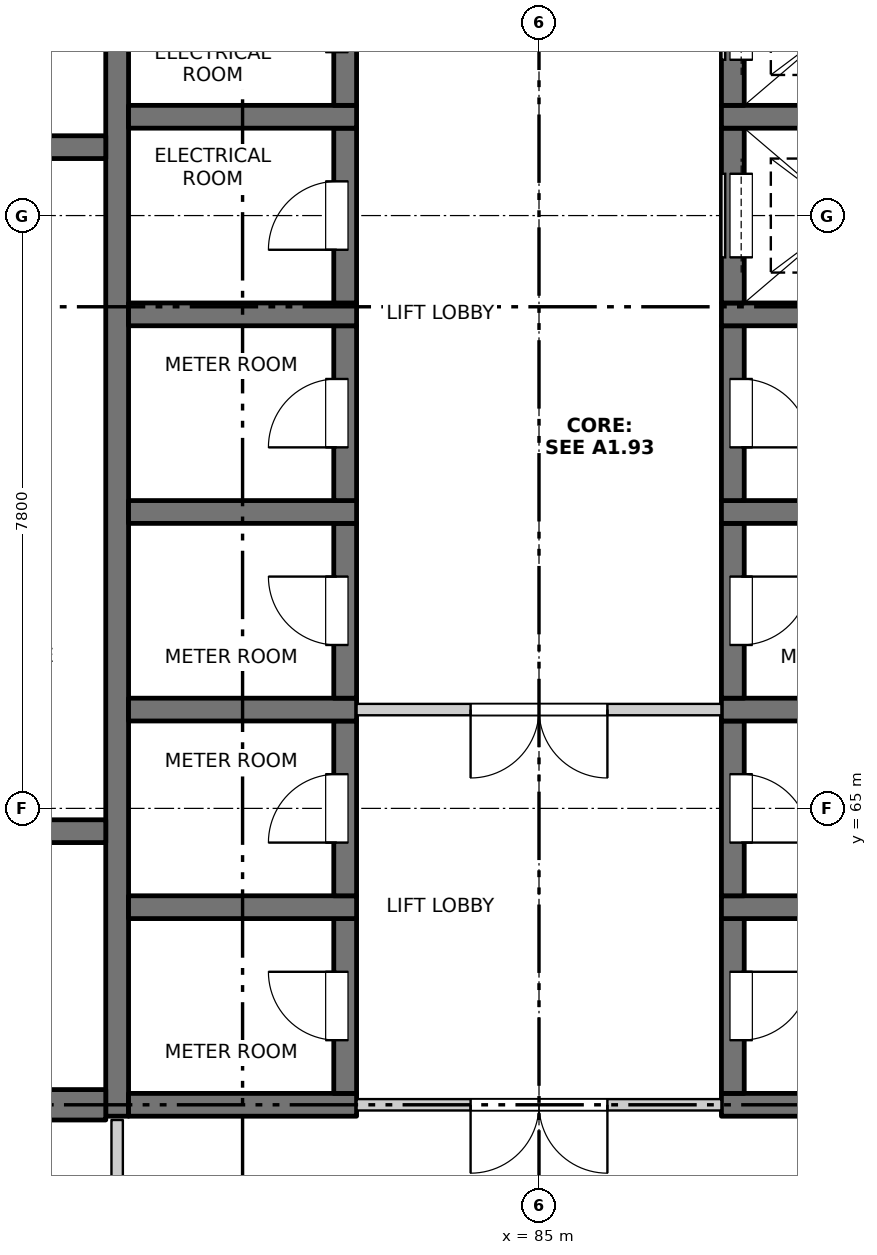
"""IFC4 building model, lengths in metres.
Left out: names, types, materials, properties, quantities, classifications, styles, units other than length and angle.
Written with IfcOpenShell. Run it as: python <this file> out.ifc"""

import sys

from ifc_helpers import new_model, si_unit, direction, frame, frame_2d, origin, place, context, subcontext, project, spatial, rectangle, extrude, element, fill, save


model = new_model("IFC4")
c1 = context("Model", 3, precision=1e-05, world=origin(), true_north=direction((0.0, 1.0)))
c2 = subcontext(c1, "Body", "Model", "MODEL_VIEW")
j1 = project(units=[si_unit("LENGTHUNIT", "METRE"), si_unit("PLANEANGLEUNIT", "RADIAN")], contexts=[c1])
p1 = place(None, origin())
s1 = spatial("IfcSite", under=j1, at=p1, CompositionType="ELEMENT")
p2 = place(p1, origin())
s2 = spatial("IfcBuilding", under=s1, at=p2, CompositionType="ELEMENT")
p3 = place(p2, frame((0.0, 0.0, 155.4)))
s3 = spatial("IfcBuildingStorey", under=s2, at=p3, CompositionType="ELEMENT", Elevation=155.4)
p4 = place(p3, frame((79.45, 60.95, -0.25), z_axis=(0.0, 0.0, 1.0), x_axis=(0.0, 1.0, 0.0)))
e1 = element("IfcWall", 1, at=p4, inside=s3, PredefinedType="SOLIDWALL", context=c2, shape_type="SweptSolid", body=[
    extrude(rectangle(XDim=16.35, YDim=0.3, at=frame_2d((8.175, 0.0))), origin(), (0.0, 0.0, 1.0), 3.4),
])
p5 = place(p3, frame((79.6, 61.1, -0.25), z_axis=(0.0, 0.0, 1.0), x_axis=(1.0, 0.0, 0.0)))
e2 = element("IfcWall", 2, at=p5, inside=s3, PredefinedType="SOLIDWALL", context=c2, shape_type="SweptSolid", body=[
    extrude(rectangle(XDim=3.0, YDim=0.3, at=frame_2d((1.5, 0.0))), origin(), (0.0, 0.0, 1.0), 3.4),
])
p6 = place(p3, frame((82.45, 61.25, -0.25), z_axis=(0.0, 0.0, 1.0), x_axis=(0.0, 1.0, 0.0)))
e3 = element("IfcWall", 3, at=p6, inside=s3, PredefinedType="SOLIDWALL", context=c2, shape_type="SweptSolid", body=[
    extrude(rectangle(XDim=2.3, YDim=0.3, at=frame_2d((1.15, 0.0))), origin(), (0.0, 0.0, 1.0), 3.4),
])
p7 = place(p6, frame((0.7, 0.0, 0.25)))
e4 = element("IfcOpeningElement", 4, at=p7, cuts=e3, PredefinedType="OPENING", context=c2, shape_type="SweptSolid", body=[
    extrude(rectangle(XDim=0.9, YDim=2.1, at=frame_2d((0.45, 1.05))), frame((0.0, 0.16, 0.0), z_axis=(0.0, -1.0, 0.0), x_axis=(1.0, 0.0, 0.0)), (0.0, 0.0, 1.0), 0.32),
])
p8 = place(p3, frame((79.6, 63.7, -0.25), z_axis=(0.0, 0.0, 1.0), x_axis=(1.0, 0.0, 0.0)))
e5 = element("IfcWall", 5, at=p8, inside=s3, PredefinedType="SOLIDWALL", context=c2, shape_type="SweptSolid", body=[
    extrude(rectangle(XDim=3.0, YDim=0.3, at=frame_2d((1.5, 0.0))), origin(), (0.0, 0.0, 1.0), 3.4),
])
p9 = place(p3, frame((82.45, 63.85, -0.25), z_axis=(0.0, 0.0, 1.0), x_axis=(0.0, 1.0, 0.0)))
e6 = element("IfcWall", 6, at=p9, inside=s3, PredefinedType="SOLIDWALL", context=c2, shape_type="SweptSolid", body=[
    extrude(rectangle(XDim=2.3, YDim=0.3, at=frame_2d((1.15, 0.0))), origin(), (0.0, 0.0, 1.0), 3.4),
])
p10 = place(p9, frame((0.7, 0.0, 0.25)))
e7 = element("IfcOpeningElement", 7, at=p10, cuts=e6, PredefinedType="OPENING", context=c2, shape_type="SweptSolid", body=[
    extrude(rectangle(XDim=0.9, YDim=2.1, at=frame_2d((0.45, 1.05))), frame((0.0, 0.16, 0.0), z_axis=(0.0, -1.0, 0.0), x_axis=(1.0, 0.0, 0.0)), (0.0, 0.0, 1.0), 0.32),
])
p11 = place(p3, frame((79.6, 66.3, -0.25), z_axis=(0.0, 0.0, 1.0), x_axis=(1.0, 0.0, 0.0)))
e8 = element("IfcWall", 8, at=p11, inside=s3, PredefinedType="SOLIDWALL", context=c2, shape_type="SweptSolid", body=[
    extrude(rectangle(XDim=3.0, YDim=0.3, at=frame_2d((1.5, 0.0))), origin(), (0.0, 0.0, 1.0), 3.4),
])
p12 = place(p3, frame((82.45, 66.45, -0.25), z_axis=(0.0, 0.0, 1.0), x_axis=(0.0, 1.0, 0.0)))
e9 = element("IfcWall", 9, at=p12, inside=s3, PredefinedType="SOLIDWALL", context=c2, shape_type="SweptSolid", body=[
    extrude(rectangle(XDim=2.3, YDim=0.3, at=frame_2d((1.15, 0.0))), origin(), (0.0, 0.0, 1.0), 3.4),
])
p13 = place(p12, frame((0.7, 0.0, 0.25)))
e10 = element("IfcOpeningElement", 10, at=p13, cuts=e9, PredefinedType="OPENING", context=c2, shape_type="SweptSolid", body=[
    extrude(rectangle(XDim=0.9, YDim=2.1, at=frame_2d((0.45, 1.05))), frame((0.0, 0.16, 0.0), z_axis=(0.0, -1.0, 0.0), x_axis=(1.0, 0.0, 0.0)), (0.0, 0.0, 1.0), 0.32),
])
p14 = place(p3, frame((79.6, 68.9, -0.25), z_axis=(0.0, 0.0, 1.0), x_axis=(1.0, 0.0, 0.0)))
e11 = element("IfcWall", 11, at=p14, inside=s3, PredefinedType="SOLIDWALL", context=c2, shape_type="SweptSolid", body=[
    extrude(rectangle(XDim=3.0, YDim=0.3, at=frame_2d((1.5, 0.0))), origin(), (0.0, 0.0, 1.0), 3.4),
])
p15 = place(p3, frame((82.45, 69.05, -0.25), z_axis=(0.0, 0.0, 1.0), x_axis=(0.0, 1.0, 0.0)))
e12 = element("IfcWall", 12, at=p15, inside=s3, PredefinedType="SOLIDWALL", context=c2, shape_type="SweptSolid", body=[
    extrude(rectangle(XDim=2.3, YDim=0.3, at=frame_2d((1.15, 0.0))), origin(), (0.0, 0.0, 1.0), 3.4),
])
p16 = place(p15, frame((0.7, 0.0, 0.25)))
e13 = element("IfcOpeningElement", 13, at=p16, cuts=e12, PredefinedType="OPENING", context=c2, shape_type="SweptSolid", body=[
    extrude(rectangle(XDim=0.9, YDim=2.1, at=frame_2d((0.45, 1.05))), frame((0.0, 0.16, 0.0), z_axis=(0.0, -1.0, 0.0), x_axis=(1.0, 0.0, 0.0)), (0.0, 0.0, 1.0), 0.32),
])
p17 = place(p3, frame((79.6, 71.5, -0.25), z_axis=(0.0, 0.0, 1.0), x_axis=(1.0, 0.0, 0.0)))
e14 = element("IfcWall", 14, at=p17, inside=s3, PredefinedType="SOLIDWALL", context=c2, shape_type="SweptSolid", body=[
    extrude(rectangle(XDim=3.0, YDim=0.3, at=frame_2d((1.5, 0.0))), origin(), (0.0, 0.0, 1.0), 3.4),
])
p18 = place(p3, frame((82.45, 71.65, -0.25), z_axis=(0.0, 0.0, 1.0), x_axis=(0.0, 1.0, 0.0)))
e15 = element("IfcWall", 15, at=p18, inside=s3, PredefinedType="SOLIDWALL", context=c2, shape_type="SweptSolid", body=[
    extrude(rectangle(XDim=2.3, YDim=0.3, at=frame_2d((1.15, 0.0))), origin(), (0.0, 0.0, 1.0), 3.4),
])
p19 = place(p18, frame((0.7, 0.0, 0.25)))
e16 = element("IfcOpeningElement", 16, at=p19, cuts=e15, PredefinedType="OPENING", context=c2, shape_type="SweptSolid", body=[
    extrude(rectangle(XDim=0.9, YDim=2.1, at=frame_2d((0.45, 1.05))), frame((0.0, 0.16, 0.0), z_axis=(0.0, -1.0, 0.0), x_axis=(1.0, 0.0, 0.0)), (0.0, 0.0, 1.0), 0.32),
])
p20 = place(p3, frame((79.6, 74.1, -0.25), z_axis=(0.0, 0.0, 1.0), x_axis=(1.0, 0.0, 0.0)))
e17 = element("IfcWall", 17, at=p20, inside=s3, PredefinedType="SOLIDWALL", context=c2, shape_type="SweptSolid", body=[
    extrude(rectangle(XDim=3.0, YDim=0.3, at=frame_2d((1.5, 0.0))), origin(), (0.0, 0.0, 1.0), 3.4),
])
p21 = place(p3, frame((82.45, 74.25, -0.25), z_axis=(0.0, 0.0, 1.0), x_axis=(0.0, 1.0, 0.0)))
e18 = element("IfcWall", 18, at=p21, inside=s3, PredefinedType="SOLIDWALL", context=c2, shape_type="SweptSolid", body=[
    extrude(rectangle(XDim=2.3, YDim=0.3, at=frame_2d((1.15, 0.0))), origin(), (0.0, 0.0, 1.0), 3.4),
])
p22 = place(p21, frame((0.7, 0.0, 0.25)))
e19 = element("IfcOpeningElement", 19, at=p22, cuts=e18, PredefinedType="OPENING", context=c2, shape_type="SweptSolid", body=[
    extrude(rectangle(XDim=0.9, YDim=2.1, at=frame_2d((0.45, 1.05))), frame((0.0, 0.16, 0.0), z_axis=(0.0, -1.0, 0.0), x_axis=(1.0, 0.0, 0.0)), (0.0, 0.0, 1.0), 0.32),
])
p23 = place(p3, frame((87.4, 61.1, -0.25), z_axis=(0.0, 0.0, 1.0), x_axis=(1.0, 0.0, 0.0)))
e20 = element("IfcWall", 20, at=p23, inside=s3, PredefinedType="SOLIDWALL", context=c2, shape_type="SweptSolid", body=[
    extrude(rectangle(XDim=3.0, YDim=0.3, at=frame_2d((1.5, 0.0))), origin(), (0.0, 0.0, 1.0), 3.4),
])
p24 = place(p3, frame((87.55, 61.25, -0.25), z_axis=(0.0, 0.0, 1.0), x_axis=(0.0, 1.0, 0.0)))
e21 = element("IfcWall", 21, at=p24, inside=s3, PredefinedType="SOLIDWALL", context=c2, shape_type="SweptSolid", body=[
    extrude(rectangle(XDim=2.3, YDim=0.3, at=frame_2d((1.15, 0.0))), origin(), (0.0, 0.0, 1.0), 3.4),
])
p25 = place(p24, frame((0.7, 0.0, 0.25)))
e22 = element("IfcOpeningElement", 22, at=p25, cuts=e21, PredefinedType="OPENING", context=c2, shape_type="SweptSolid", body=[
    extrude(rectangle(XDim=0.9, YDim=2.1, at=frame_2d((0.45, 1.05))), frame((0.0, 0.16, 0.0), z_axis=(0.0, -1.0, 0.0), x_axis=(1.0, 0.0, 0.0)), (0.0, 0.0, 1.0), 0.32),
])
p26 = place(p3, frame((87.4, 63.7, -0.25), z_axis=(0.0, 0.0, 1.0), x_axis=(1.0, 0.0, 0.0)))
e23 = element("IfcWall", 23, at=p26, inside=s3, PredefinedType="SOLIDWALL", context=c2, shape_type="SweptSolid", body=[
    extrude(rectangle(XDim=3.0, YDim=0.3, at=frame_2d((1.5, 0.0))), origin(), (0.0, 0.0, 1.0), 3.4),
])
p27 = place(p3, frame((87.55, 63.85, -0.25), z_axis=(0.0, 0.0, 1.0), x_axis=(0.0, 1.0, 0.0)))
e24 = element("IfcWall", 24, at=p27, inside=s3, PredefinedType="SOLIDWALL", context=c2, shape_type="SweptSolid", body=[
    extrude(rectangle(XDim=2.3, YDim=0.3, at=frame_2d((1.15, 0.0))), origin(), (0.0, 0.0, 1.0), 3.4),
])
p28 = place(p27, frame((0.7, 0.0, 0.25)))
e25 = element("IfcOpeningElement", 25, at=p28, cuts=e24, PredefinedType="OPENING", context=c2, shape_type="SweptSolid", body=[
    extrude(rectangle(XDim=0.9, YDim=2.1, at=frame_2d((0.45, 1.05))), frame((0.0, 0.16, 0.0), z_axis=(0.0, -1.0, 0.0), x_axis=(1.0, 0.0, 0.0)), (0.0, 0.0, 1.0), 0.32),
])
p29 = place(p3, frame((87.4, 66.3, -0.25), z_axis=(0.0, 0.0, 1.0), x_axis=(1.0, 0.0, 0.0)))
e26 = element("IfcWall", 26, at=p29, inside=s3, PredefinedType="SOLIDWALL", context=c2, shape_type="SweptSolid", body=[
    extrude(rectangle(XDim=3.0, YDim=0.3, at=frame_2d((1.5, 0.0))), origin(), (0.0, 0.0, 1.0), 3.4),
])
p30 = place(p3, frame((87.55, 66.45, -0.25), z_axis=(0.0, 0.0, 1.0), x_axis=(0.0, 1.0, 0.0)))
e27 = element("IfcWall", 27, at=p30, inside=s3, PredefinedType="SOLIDWALL", context=c2, shape_type="SweptSolid", body=[
    extrude(rectangle(XDim=2.3, YDim=0.3, at=frame_2d((1.15, 0.0))), origin(), (0.0, 0.0, 1.0), 3.4),
])
p31 = place(p30, frame((0.7, 0.0, 0.25)))
e28 = element("IfcOpeningElement", 28, at=p31, cuts=e27, PredefinedType="OPENING", context=c2, shape_type="SweptSolid", body=[
    extrude(rectangle(XDim=0.9, YDim=2.1, at=frame_2d((0.45, 1.05))), frame((0.0, 0.16, 0.0), z_axis=(0.0, -1.0, 0.0), x_axis=(1.0, 0.0, 0.0)), (0.0, 0.0, 1.0), 0.32),
])
p32 = place(p3, frame((87.4, 68.9, -0.25), z_axis=(0.0, 0.0, 1.0), x_axis=(1.0, 0.0, 0.0)))
e29 = element("IfcWall", 29, at=p32, inside=s3, PredefinedType="SOLIDWALL", context=c2, shape_type="SweptSolid", body=[
    extrude(rectangle(XDim=3.0, YDim=0.3, at=frame_2d((1.5, 0.0))), origin(), (0.0, 0.0, 1.0), 3.4),
])
p33 = place(p3, frame((87.55, 69.05, -0.25), z_axis=(0.0, 0.0, 1.0), x_axis=(0.0, 1.0, 0.0)))
e30 = element("IfcWall", 30, at=p33, inside=s3, PredefinedType="SOLIDWALL", context=c2, shape_type="SweptSolid", body=[
    extrude(rectangle(XDim=2.3, YDim=0.3, at=frame_2d((1.15, 0.0))), origin(), (0.0, 0.0, 1.0), 3.4),
])
p34 = place(p33, frame((0.7, 0.0, 0.25)))
e31 = element("IfcOpeningElement", 31, at=p34, cuts=e30, PredefinedType="OPENING", context=c2, shape_type="SweptSolid", body=[
    extrude(rectangle(XDim=0.9, YDim=2.1, at=frame_2d((0.45, 1.05))), frame((0.0, 0.16, 0.0), z_axis=(0.0, -1.0, 0.0), x_axis=(1.0, 0.0, 0.0)), (0.0, 0.0, 1.0), 0.32),
])
p35 = place(p3, frame((87.4, 71.5, -0.25), z_axis=(0.0, 0.0, 1.0), x_axis=(1.0, 0.0, 0.0)))
e32 = element("IfcWall", 32, at=p35, inside=s3, PredefinedType="SOLIDWALL", context=c2, shape_type="SweptSolid", body=[
    extrude(rectangle(XDim=3.0, YDim=0.3, at=frame_2d((1.5, 0.0))), origin(), (0.0, 0.0, 1.0), 3.4),
])
p36 = place(p3, frame((87.55, 71.65, -0.25), z_axis=(0.0, 0.0, 1.0), x_axis=(0.0, 1.0, 0.0)))
e33 = element("IfcWall", 33, at=p36, inside=s3, PredefinedType="SOLIDWALL", context=c2, shape_type="SweptSolid", body=[
    extrude(rectangle(XDim=2.3, YDim=0.3, at=frame_2d((1.15, 0.0))), origin(), (0.0, 0.0, 1.0), 3.4),
])
p37 = place(p36, frame((0.6, 0.0, 0.25)))
e34 = element("IfcOpeningElement", 34, at=p37, cuts=e33, PredefinedType="OPENING", context=c2, shape_type="SweptSolid", body=[
    extrude(rectangle(XDim=1.1, YDim=2.1, at=frame_2d((0.55, 1.05))), frame((0.0, 0.16, 0.0), z_axis=(0.0, -1.0, 0.0), x_axis=(1.0, 0.0, 0.0)), (0.0, 0.0, 1.0), 0.32),
])
p38 = place(p3, frame((87.4, 74.1, -0.25), z_axis=(0.0, 0.0, 1.0), x_axis=(1.0, 0.0, 0.0)))
e35 = element("IfcWall", 35, at=p38, inside=s3, PredefinedType="SOLIDWALL", context=c2, shape_type="SweptSolid", body=[
    extrude(rectangle(XDim=3.0, YDim=0.3, at=frame_2d((1.5, 0.0))), origin(), (0.0, 0.0, 1.0), 3.4),
])
p39 = place(p3, frame((87.55, 74.25, -0.25), z_axis=(0.0, 0.0, 1.0), x_axis=(0.0, 1.0, 0.0)))
e36 = element("IfcWall", 36, at=p39, inside=s3, PredefinedType="SOLIDWALL", context=c2, shape_type="SweptSolid", body=[
    extrude(rectangle(XDim=2.3, YDim=0.3, at=frame_2d((1.15, 0.0))), origin(), (0.0, 0.0, 1.0), 3.4),
])
p40 = place(p39, frame((0.6, 0.0, 0.25)))
e37 = element("IfcOpeningElement", 37, at=p40, cuts=e36, PredefinedType="OPENING", context=c2, shape_type="SweptSolid", body=[
    extrude(rectangle(XDim=1.1, YDim=2.1, at=frame_2d((0.55, 1.05))), frame((0.0, 0.16, 0.0), z_axis=(0.0, -1.0, 0.0), x_axis=(1.0, 0.0, 0.0)), (0.0, 0.0, 1.0), 0.32),
])
p41 = place(p3, frame((75.525, 61.1, -0.25), z_axis=(0.0, 0.0, 1.0), x_axis=(1.0, 0.0, 0.0)))
e38 = element("IfcWall", 38, at=p41, inside=s3, PredefinedType="SOLIDWALL", context=c2, shape_type="SweptSolid", body=[
    extrude(rectangle(XDim=3.775, YDim=0.4, at=frame_2d((1.888, 0.0))), origin(), (0.0, 0.0, 1.0), 3.4),
])
for number, where, z_axis, x_axis in (
    (39, (75.525, 64.7, -0.25), (0.0, 0.0, 1.0), (1.0, 0.0, 0.0)),
    (40, (75.525, 73.7, -0.25), (0.0, 0.0, 1.0), (1.0, 0.0, 0.0)),
):
    element("IfcWall", number, at=place(p3, frame(where, z_axis=z_axis, x_axis=x_axis)), inside=s3, PredefinedType="SOLIDWALL", context=c2, shape_type="SweptSolid", body=[
        extrude(rectangle(XDim=3.775, YDim=0.3, at=frame_2d((1.888, 0.0))), origin(), (0.0, 0.0, 1.0), 3.4),
    ])
p42 = place(p3, frame((82.6, 61.1, 0.0), z_axis=(0.0, 0.0, 1.0), x_axis=(1.0, 0.0, 0.0)))
e41 = element("IfcWall", 41, at=p42, inside=s3, PredefinedType="PARTITIONING", context=c2, shape_type="SweptSolid", body=[
    extrude(rectangle(XDim=4.8, YDim=0.15, at=frame_2d((2.4, 0.0))), origin(), (0.0, 0.0, 1.0), 3.15),
])
p43 = place(p42, frame((1.5, 0.0, 0.0)))
e42 = element("IfcOpeningElement", 42, at=p43, cuts=e41, PredefinedType="OPENING", context=c2, shape_type="SweptSolid", body=[
    extrude(rectangle(XDim=1.8, YDim=2.1, at=frame_2d((0.9, 1.05))), frame((0.0, 0.085, 0.0), z_axis=(0.0, -1.0, 0.0), x_axis=(1.0, 0.0, 0.0)), (0.0, 0.0, 1.0), 0.17),
])
p44 = place(p3, frame((82.6, 66.3, 0.0), z_axis=(0.0, 0.0, 1.0), x_axis=(1.0, 0.0, 0.0)))
e43 = element("IfcWall", 43, at=p44, inside=s3, PredefinedType="PARTITIONING", context=c2, shape_type="SweptSolid", body=[
    extrude(rectangle(XDim=4.8, YDim=0.15, at=frame_2d((2.4, 0.0))), origin(), (0.0, 0.0, 1.0), 3.15),
])
p45 = place(p44, frame((1.5, 0.0, 0.0)))
e44 = element("IfcOpeningElement", 44, at=p45, cuts=e43, PredefinedType="OPENING", context=c2, shape_type="SweptSolid", body=[
    extrude(rectangle(XDim=1.8, YDim=2.1, at=frame_2d((0.9, 1.05))), frame((0.0, 0.085, 0.0), z_axis=(0.0, -1.0, 0.0), x_axis=(1.0, 0.0, 0.0)), (0.0, 0.0, 1.0), 0.17),
])
p46 = place(p3, frame((79.45, 55.525, 0.0), z_axis=(0.0, 0.0, 1.0), x_axis=(0.0, 1.0, 0.0)))
e45 = element("IfcWall", 45, at=p46, inside=s3, PredefinedType="PARTITIONING", context=c2, shape_type="SweptSolid", body=[
    extrude(rectangle(XDim=5.375, YDim=0.15, at=frame_2d((2.688, 0.0))), origin(), (0.0, 0.0, 1.0), 3.15),
])
p47 = place(p46, frame((2.175, 0.0, 0.0)))
e46 = element("IfcOpeningElement", 46, at=p47, cuts=e45, PredefinedType="OPENING", context=c2, shape_type="SweptSolid", body=[
    extrude(rectangle(XDim=0.9, YDim=2.1, at=frame_2d((0.45, 1.05))), frame((0.0, 0.085, 0.0), z_axis=(0.0, -1.0, 0.0), x_axis=(1.0, 0.0, 0.0)), (0.0, 0.0, 1.0), 0.17),
])
p48 = place(p43, origin())
e47 = element("IfcDoor", 47, at=p48, inside=s3, OperationType="DOUBLE_DOOR_SINGLE_SWING", PredefinedType="DOOR", context=c2, shape_type="SweptSolid", body=[
    extrude(rectangle(XDim=1.8, YDim=2.1, at=frame_2d((0.9, 1.05))), frame((0.0, 0.025, 0.0), z_axis=(0.0, -1.0, 0.0), x_axis=(1.0, 0.0, 0.0)), (0.0, 0.0, 1.0), 0.05),
])
fill(e42, e47)
p49 = place(p7, origin())
e48 = element("IfcDoor", 48, at=p49, inside=s3, OperationType="SINGLE_SWING_RIGHT", PredefinedType="DOOR", context=c2, shape_type="SweptSolid", body=[
    extrude(rectangle(XDim=0.9, YDim=2.1, at=frame_2d((0.45, 1.05))), frame((0.0, 0.135, 0.0), z_axis=(0.0, -1.0, 0.0), x_axis=(1.0, 0.0, 0.0)), (0.0, 0.0, 1.0), 0.05),
])
fill(e4, e48)
p50 = place(p25, origin())
e49 = element("IfcDoor", 49, at=p50, inside=s3, OperationType="SINGLE_SWING_LEFT", PredefinedType="DOOR", context=c2, shape_type="SweptSolid", body=[
    extrude(rectangle(XDim=0.9, YDim=2.1, at=frame_2d((0.45, 1.05))), frame((0.0, -0.085, 0.0), z_axis=(0.0, -1.0, 0.0), x_axis=(1.0, 0.0, 0.0)), (0.0, 0.0, 1.0), 0.05),
])
fill(e22, e49)
p51 = place(p10, origin())
e50 = element("IfcDoor", 50, at=p51, inside=s3, OperationType="SINGLE_SWING_LEFT", PredefinedType="DOOR", context=c2, shape_type="SweptSolid", body=[
    extrude(rectangle(XDim=0.9, YDim=2.1, at=frame_2d((0.45, 1.05))), frame((0.0, 0.135, 0.0), z_axis=(0.0, -1.0, 0.0), x_axis=(1.0, 0.0, 0.0)), (0.0, 0.0, 1.0), 0.05),
])
fill(e7, e50)
p52 = place(p28, origin())
e51 = element("IfcDoor", 51, at=p52, inside=s3, OperationType="SINGLE_SWING_RIGHT", PredefinedType="DOOR", context=c2, shape_type="SweptSolid", body=[
    extrude(rectangle(XDim=0.9, YDim=2.1, at=frame_2d((0.45, 1.05))), frame((0.0, -0.085, 0.0), z_axis=(0.0, -1.0, 0.0), x_axis=(1.0, 0.0, 0.0)), (0.0, 0.0, 1.0), 0.05),
])
fill(e25, e51)
p53 = place(p45, origin())
e52 = element("IfcDoor", 52, at=p53, inside=s3, OperationType="DOUBLE_DOOR_SINGLE_SWING", PredefinedType="DOOR", context=c2, shape_type="SweptSolid", body=[
    extrude(rectangle(XDim=1.8, YDim=2.1, at=frame_2d((0.9, 1.05))), frame((0.0, 0.025, 0.0), z_axis=(0.0, -1.0, 0.0), x_axis=(1.0, 0.0, 0.0)), (0.0, 0.0, 1.0), 0.05),
])
fill(e44, e52)
p54 = place(p13, origin())
e53 = element("IfcDoor", 53, at=p54, inside=s3, OperationType="SINGLE_SWING_RIGHT", PredefinedType="DOOR", context=c2, shape_type="SweptSolid", body=[
    extrude(rectangle(XDim=0.9, YDim=2.1, at=frame_2d((0.45, 1.05))), frame((0.0, 0.135, 0.0), z_axis=(0.0, -1.0, 0.0), x_axis=(1.0, 0.0, 0.0)), (0.0, 0.0, 1.0), 0.05),
])
fill(e10, e53)
p55 = place(p31, origin())
e54 = element("IfcDoor", 54, at=p55, inside=s3, OperationType="SINGLE_SWING_LEFT", PredefinedType="DOOR", context=c2, shape_type="SweptSolid", body=[
    extrude(rectangle(XDim=0.9, YDim=2.1, at=frame_2d((0.45, 1.05))), frame((0.0, -0.085, 0.0), z_axis=(0.0, -1.0, 0.0), x_axis=(1.0, 0.0, 0.0)), (0.0, 0.0, 1.0), 0.05),
])
fill(e28, e54)
p56 = place(p16, origin())
e55 = element("IfcDoor", 55, at=p56, inside=s3, OperationType="SINGLE_SWING_LEFT", PredefinedType="DOOR", context=c2, shape_type="SweptSolid", body=[
    extrude(rectangle(XDim=0.9, YDim=2.1, at=frame_2d((0.45, 1.05))), frame((0.0, 0.135, 0.0), z_axis=(0.0, -1.0, 0.0), x_axis=(1.0, 0.0, 0.0)), (0.0, 0.0, 1.0), 0.05),
])
fill(e13, e55)
p57 = place(p34, origin())
e56 = element("IfcDoor", 56, at=p57, inside=s3, OperationType="SINGLE_SWING_RIGHT", PredefinedType="DOOR", context=c2, shape_type="SweptSolid", body=[
    extrude(rectangle(XDim=0.9, YDim=2.1, at=frame_2d((0.45, 1.05))), frame((0.0, -0.085, 0.0), z_axis=(0.0, -1.0, 0.0), x_axis=(1.0, 0.0, 0.0)), (0.0, 0.0, 1.0), 0.05),
])
fill(e31, e56)
p58 = place(p19, origin())
e57 = element("IfcDoor", 57, at=p58, inside=s3, OperationType="SINGLE_SWING_LEFT", PredefinedType="DOOR", context=c2, shape_type="SweptSolid", body=[
    extrude(rectangle(XDim=0.9, YDim=2.1, at=frame_2d((0.45, 1.05))), frame((0.0, 0.135, 0.0), z_axis=(0.0, -1.0, 0.0), x_axis=(1.0, 0.0, 0.0)), (0.0, 0.0, 1.0), 0.05),
])
fill(e16, e57)
p59 = place(p37, origin())
e58 = element("IfcDoor", 58, at=p59, inside=s3, OperationType="SLIDING_TO_LEFT", PredefinedType="DOOR", context=c2, shape_type="SweptSolid", body=[
    extrude(rectangle(XDim=1.1, YDim=2.1, at=frame_2d((0.55, 1.05))), frame((0.0, -0.085, 0.0), z_axis=(0.0, -1.0, 0.0), x_axis=(1.0, 0.0, 0.0)), (0.0, 0.0, 1.0), 0.05),
])
fill(e34, e58)
p60 = place(p22, origin())
e59 = element("IfcDoor", 59, at=p60, inside=s3, OperationType="SINGLE_SWING_RIGHT", PredefinedType="DOOR", context=c2, shape_type="SweptSolid", body=[
    extrude(rectangle(XDim=0.9, YDim=2.1, at=frame_2d((0.45, 1.05))), frame((0.0, 0.135, 0.0), z_axis=(0.0, -1.0, 0.0), x_axis=(1.0, 0.0, 0.0)), (0.0, 0.0, 1.0), 0.05),
])
fill(e19, e59)
p61 = place(p40, origin())
e60 = element("IfcDoor", 60, at=p61, inside=s3, OperationType="SLIDING_TO_LEFT", PredefinedType="DOOR", context=c2, shape_type="SweptSolid", body=[
    extrude(rectangle(XDim=1.1, YDim=2.1, at=frame_2d((0.55, 1.05))), frame((0.0, -0.085, 0.0), z_axis=(0.0, -1.0, 0.0), x_axis=(1.0, 0.0, 0.0)), (0.0, 0.0, 1.0), 0.05),
])
fill(e37, e60)
save(model, sys.argv[1])
